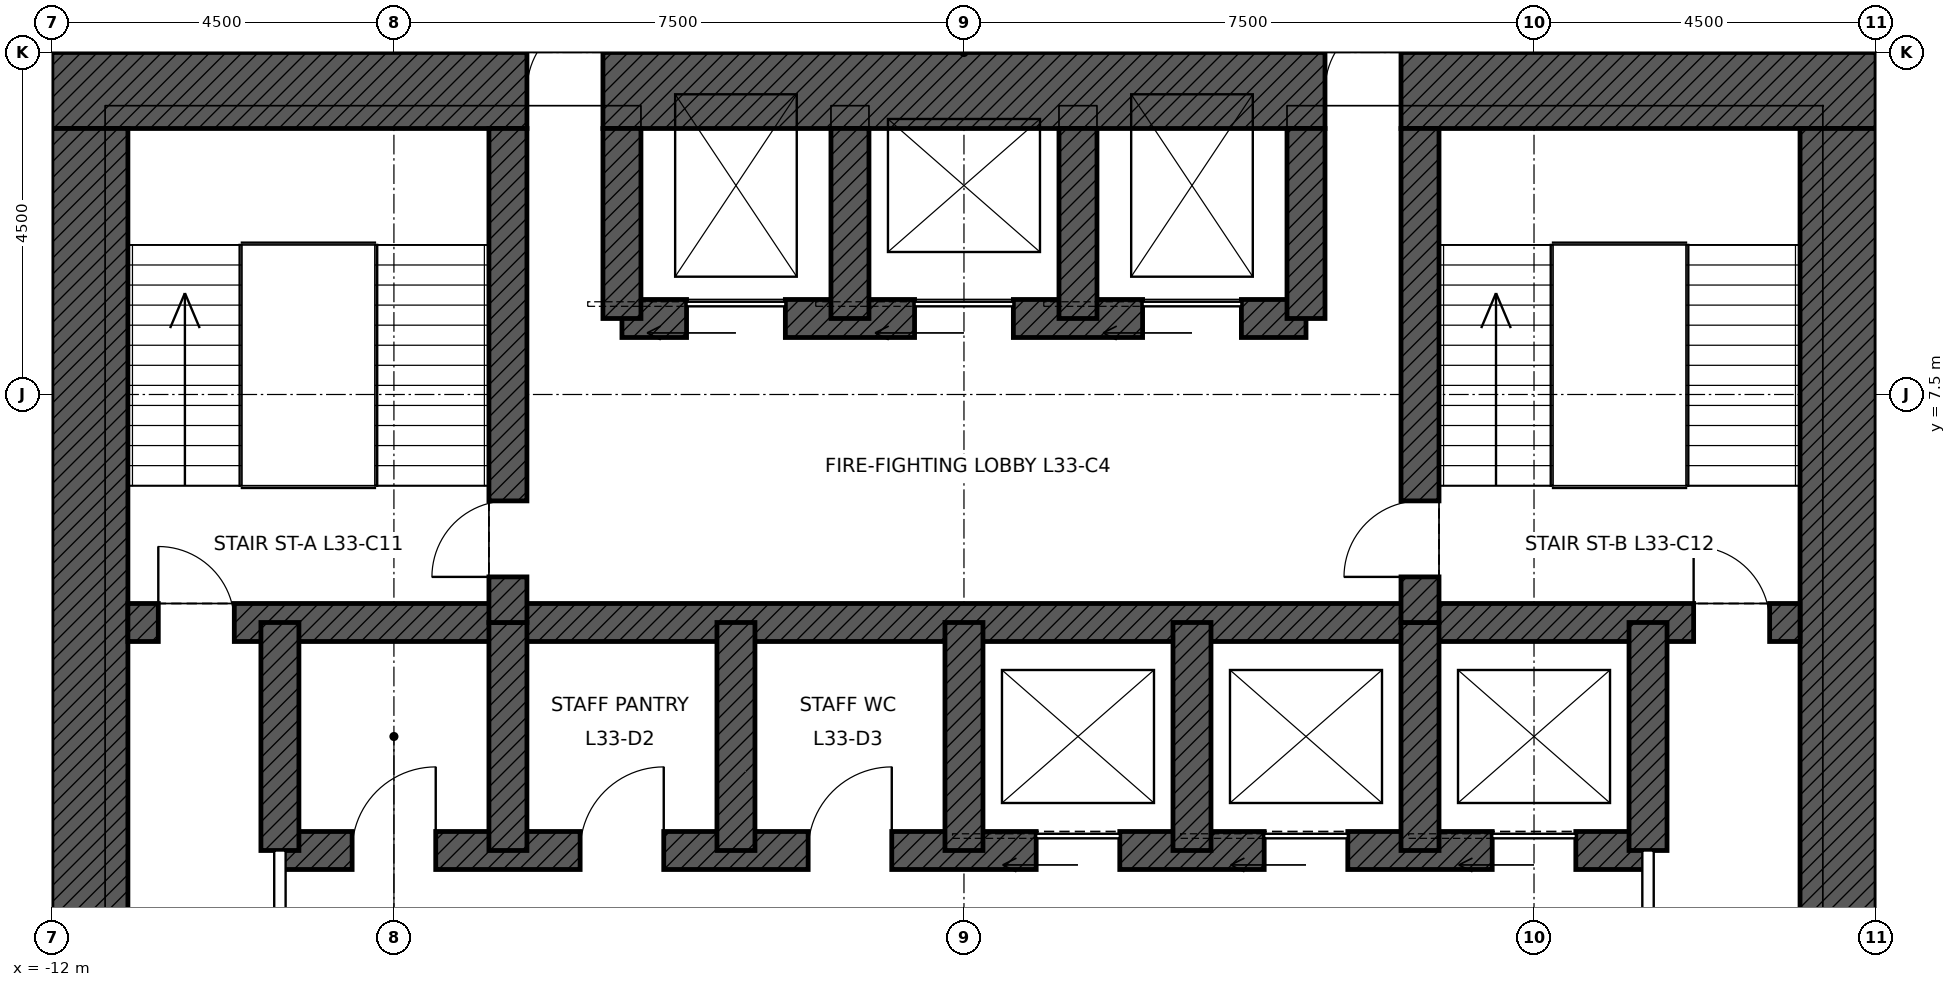
"""IFC4 building model, lengths in metres.
Left out: names, types, materials, properties, quantities, classifications, styles, units other than length and angle.
Written with IfcOpenShell. Run it as: python <this file> out.ifc"""

import sys

from ifc_helpers import new_model, si_unit, direction, frame, frame_2d, origin, place, context, subcontext, project, spatial, rectangle, extrude, element, fill, save


model = new_model("IFC4")
c1 = context("Model", 3, precision=1e-05, world=origin(), true_north=direction((0.0, 1.0)))
c2 = subcontext(c1, "Body", "Model", "MODEL_VIEW")
j1 = project(units=[si_unit("LENGTHUNIT", "METRE"), si_unit("PLANEANGLEUNIT", "RADIAN")], contexts=[c1])
p1 = place(None, origin())
s1 = spatial("IfcSite", under=j1, at=p1, CompositionType="ELEMENT")
p2 = place(p1, origin())
s2 = spatial("IfcBuilding", under=s1, at=p2, CompositionType="ELEMENT")
p3 = place(p2, frame((0.0, 0.0, 162.9)))
s3 = spatial("IfcBuildingStorey", under=s2, at=p3, CompositionType="ELEMENT", Elevation=162.9)
p4 = place(p3, frame((-12.0, 11.5, 0.0), z_axis=(0.0, 0.0, 1.0), x_axis=(1.0, 0.0, 0.0)))
e1 = element("IfcWall", 1, at=p4, inside=s3, PredefinedType="SHEAR", context=c2, shape_type="SweptSolid", body=[
    extrude(rectangle(XDim=24.0, YDim=1.0, at=frame_2d((12.0, 0.0))), origin(), (0.0, 0.0, 1.0), 4.5),
])
p5 = place(p4, frame((6.25, 0.0, 0.0)))
e2 = element("IfcOpeningElement", 2, at=p5, cuts=e1, PredefinedType="OPENING", context=c2, shape_type="SweptSolid", body=[
    extrude(rectangle(XDim=1.0, YDim=2.4, at=frame_2d((0.5, 1.2))), frame((0.0, 0.51, 0.0), z_axis=(0.0, -1.0, 0.0), x_axis=(1.0, 0.0, 0.0)), (0.0, 0.0, 1.0), 1.02),
])
p6 = place(p4, frame((16.75, 0.0, 0.0)))
e3 = element("IfcOpeningElement", 3, at=p6, cuts=e1, PredefinedType="OPENING", context=c2, shape_type="SweptSolid", body=[
    extrude(rectangle(XDim=1.0, YDim=2.4, at=frame_2d((0.5, 1.2))), frame((0.0, 0.51, 0.0), z_axis=(0.0, -1.0, 0.0), x_axis=(1.0, 0.0, 0.0)), (0.0, 0.0, 1.0), 1.02),
])
p7 = place(p3, frame((11.5, 11.0, 0.0), z_axis=(0.0, 0.0, 1.0), x_axis=(0.0, -1.0, 0.0)))
e4 = element("IfcWall", 4, at=p7, inside=s3, PredefinedType="SHEAR", context=c2, shape_type="SweptSolid", body=[
    extrude(rectangle(XDim=22.0, YDim=1.0, at=frame_2d((11.0, 0.0))), origin(), (0.0, 0.0, 1.0), 4.5),
])
p8 = place(p7, frame((10.5, 0.0, 0.0)))
e5 = element("IfcOpeningElement", 5, at=p8, cuts=e4, PredefinedType="OPENING", context=c2, shape_type="SweptSolid", body=[
    extrude(rectangle(XDim=1.0, YDim=2.4, at=frame_2d((0.5, 1.2))), frame((0.0, 0.51, 0.0), z_axis=(0.0, -1.0, 0.0), x_axis=(1.0, 0.0, 0.0)), (0.0, 0.0, 1.0), 1.02),
])
p9 = place(p3, frame((-11.5, -11.0, 0.0), z_axis=(0.0, 0.0, 1.0), x_axis=(0.0, 1.0, 0.0)))
e6 = element("IfcWall", 6, at=p9, inside=s3, PredefinedType="SHEAR", context=c2, shape_type="SweptSolid", body=[
    extrude(rectangle(XDim=22.0, YDim=1.0, at=frame_2d((11.0, 0.0))), origin(), (0.0, 0.0, 1.0), 4.5),
])
p10 = place(p9, frame((10.5, 0.0, 0.0)))
e7 = element("IfcOpeningElement", 7, at=p10, cuts=e6, PredefinedType="OPENING", context=c2, shape_type="SweptSolid", body=[
    extrude(rectangle(XDim=1.0, YDim=2.4, at=frame_2d((0.5, 1.2))), frame((0.0, 0.51, 0.0), z_axis=(0.0, -1.0, 0.0), x_axis=(1.0, 0.0, 0.0)), (0.0, 0.0, 1.0), 1.02),
])
p11 = place(p3, frame((-11.0, 4.5, 0.0), z_axis=(0.0, 0.0, 1.0), x_axis=(1.0, 0.0, 0.0)))
e8 = element("IfcWall", 8, at=p11, inside=s3, PredefinedType="SHEAR", context=c2, shape_type="SweptSolid", body=[
    extrude(rectangle(XDim=22.0, YDim=0.5, at=frame_2d((11.0, 0.0))), origin(), (0.0, 0.0, 1.0), 4.5),
])
p12 = place(p11, frame((0.4, 0.0, 0.0)))
e9 = element("IfcOpeningElement", 9, at=p12, cuts=e8, PredefinedType="OPENING", context=c2, shape_type="SweptSolid", body=[
    extrude(rectangle(XDim=1.0, YDim=2.1, at=frame_2d((0.5, 1.05))), frame((0.0, 0.26, 0.0), z_axis=(0.0, -1.0, 0.0), x_axis=(1.0, 0.0, 0.0)), (0.0, 0.0, 1.0), 0.52),
])
p13 = place(p11, frame((20.6, 0.0, 0.0)))
e10 = element("IfcOpeningElement", 10, at=p13, cuts=e8, PredefinedType="OPENING", context=c2, shape_type="SweptSolid", body=[
    extrude(rectangle(XDim=1.0, YDim=2.1, at=frame_2d((0.5, 1.05))), frame((0.0, 0.26, 0.0), z_axis=(0.0, -1.0, 0.0), x_axis=(1.0, 0.0, 0.0)), (0.0, 0.0, 1.0), 0.52),
])
p14 = place(p3, frame((-9.0, 1.5, 0.0), z_axis=(0.0, 0.0, 1.0), x_axis=(1.0, 0.0, 0.0)))
e11 = element("IfcWall", 11, at=p14, inside=s3, PredefinedType="SHEAR", context=c2, shape_type="SweptSolid", body=[
    extrude(rectangle(XDim=18.0, YDim=0.5, at=frame_2d((9.0, 0.0))), origin(), (0.0, 0.0, 1.0), 4.5),
])
p15 = place(p14, frame((9.95, 0.0, 0.0)))
e12 = element("IfcOpeningElement", 12, at=p15, cuts=e11, PredefinedType="OPENING", context=c2, shape_type="SweptSolid", body=[
    extrude(rectangle(XDim=1.1, YDim=2.1, at=frame_2d((0.55, 1.05))), frame((0.0, 0.26, 0.0), z_axis=(0.0, -1.0, 0.0), x_axis=(1.0, 0.0, 0.0)), (0.0, 0.0, 1.0), 0.52),
])
p16 = place(p14, frame((12.95, 0.0, 0.0)))
e13 = element("IfcOpeningElement", 13, at=p16, cuts=e11, PredefinedType="OPENING", context=c2, shape_type="SweptSolid", body=[
    extrude(rectangle(XDim=1.1, YDim=2.1, at=frame_2d((0.55, 1.05))), frame((0.0, 0.26, 0.0), z_axis=(0.0, -1.0, 0.0), x_axis=(1.0, 0.0, 0.0)), (0.0, 0.0, 1.0), 0.52),
])
p17 = place(p14, frame((15.95, 0.0, 0.0)))
e14 = element("IfcOpeningElement", 14, at=p17, cuts=e11, PredefinedType="OPENING", context=c2, shape_type="SweptSolid", body=[
    extrude(rectangle(XDim=1.1, YDim=2.1, at=frame_2d((0.55, 1.05))), frame((0.0, 0.26, 0.0), z_axis=(0.0, -1.0, 0.0), x_axis=(1.0, 0.0, 0.0)), (0.0, 0.0, 1.0), 0.52),
])
p18 = place(p14, frame((0.95, 0.0, 0.0)))
e15 = element("IfcOpeningElement", 15, at=p18, cuts=e11, PredefinedType="OPENING", context=c2, shape_type="SweptSolid", body=[
    extrude(rectangle(XDim=1.1, YDim=2.1, at=frame_2d((0.55, 1.05))), frame((0.0, 0.26, 0.0), z_axis=(0.0, -1.0, 0.0), x_axis=(1.0, 0.0, 0.0)), (0.0, 0.0, 1.0), 0.52),
])
p19 = place(p14, frame((3.95, 0.0, 0.0)))
e16 = element("IfcOpeningElement", 16, at=p19, cuts=e11, PredefinedType="OPENING", context=c2, shape_type="SweptSolid", body=[
    extrude(rectangle(XDim=1.1, YDim=2.1, at=frame_2d((0.55, 1.05))), frame((0.0, 0.26, 0.0), z_axis=(0.0, -1.0, 0.0), x_axis=(1.0, 0.0, 0.0)), (0.0, 0.0, 1.0), 0.52),
])
p20 = place(p14, frame((6.95, 0.0, 0.0)))
e17 = element("IfcOpeningElement", 17, at=p20, cuts=e11, PredefinedType="OPENING", context=c2, shape_type="SweptSolid", body=[
    extrude(rectangle(XDim=1.1, YDim=2.1, at=frame_2d((0.55, 1.05))), frame((0.0, 0.26, 0.0), z_axis=(0.0, -1.0, 0.0), x_axis=(1.0, 0.0, 0.0)), (0.0, 0.0, 1.0), 0.52),
])
p21 = place(p3, frame((-4.5, 8.5, 0.0), z_axis=(0.0, 0.0, 1.0), x_axis=(1.0, 0.0, 0.0)))
e18 = element("IfcWall", 18, at=p21, inside=s3, PredefinedType="SHEAR", context=c2, shape_type="SweptSolid", body=[
    extrude(rectangle(XDim=9.0, YDim=0.5, at=frame_2d((4.5, 0.0))), origin(), (0.0, 0.0, 1.0), 4.5),
])
p22 = place(p21, frame((0.85, 0.0, 0.0)))
e19 = element("IfcOpeningElement", 19, at=p22, cuts=e18, PredefinedType="OPENING", context=c2, shape_type="SweptSolid", body=[
    extrude(rectangle(XDim=1.3, YDim=2.4, at=frame_2d((0.65, 1.2))), frame((0.0, 0.26, 0.0), z_axis=(0.0, -1.0, 0.0), x_axis=(1.0, 0.0, 0.0)), (0.0, 0.0, 1.0), 0.52),
])
p23 = place(p21, frame((6.85, 0.0, 0.0)))
e20 = element("IfcOpeningElement", 20, at=p23, cuts=e18, PredefinedType="OPENING", context=c2, shape_type="SweptSolid", body=[
    extrude(rectangle(XDim=1.3, YDim=2.4, at=frame_2d((0.65, 1.2))), frame((0.0, 0.26, 0.0), z_axis=(0.0, -1.0, 0.0), x_axis=(1.0, 0.0, 0.0)), (0.0, 0.0, 1.0), 0.52),
])
p24 = place(p21, frame((3.85, 0.0, 0.0)))
e21 = element("IfcOpeningElement", 21, at=p24, cuts=e18, PredefinedType="OPENING", context=c2, shape_type="SweptSolid", body=[
    extrude(rectangle(XDim=1.3, YDim=2.4, at=frame_2d((0.65, 1.2))), frame((0.0, 0.26, 0.0), z_axis=(0.0, -1.0, 0.0), x_axis=(1.0, 0.0, 0.0)), (0.0, 0.0, 1.0), 0.52),
])
for number, where, z_axis, x_axis in (
    (22, (-9.0, 1.5, 0.0), (0.0, 0.0, 1.0), (0.0, 1.0, 0.0)),
    (23, (9.0, 1.5, 0.0), (0.0, 0.0, 1.0), (0.0, 1.0, 0.0)),
    (24, (-6.0, 1.5, 0.0), (0.0, 0.0, 1.0), (0.0, 1.0, 0.0)),
    (25, (-3.0, 1.5, 0.0), (0.0, 0.0, 1.0), (0.0, 1.0, 0.0)),
    (26, (0.0, 1.5, 0.0), (0.0, 0.0, 1.0), (0.0, 1.0, 0.0)),
    (27, (3.0, 1.5, 0.0), (0.0, 0.0, 1.0), (0.0, 1.0, 0.0)),
    (28, (6.0, 1.5, 0.0), (0.0, 0.0, 1.0), (0.0, 1.0, 0.0)),
):
    element("IfcWall", number, at=place(p3, frame(where, z_axis=z_axis, x_axis=x_axis)), inside=s3, PredefinedType="SHEAR", context=c2, shape_type="SweptSolid", body=[
        extrude(rectangle(XDim=3.0, YDim=0.5, at=frame_2d((1.5, 0.0))), origin(), (0.0, 0.0, 1.0), 4.5),
    ])
p25 = place(p3, frame((-6.0, 4.5, 0.0), z_axis=(0.0, 0.0, 1.0), x_axis=(0.0, 1.0, 0.0)))
e29 = element("IfcWall", 29, at=p25, inside=s3, PredefinedType="SHEAR", context=c2, shape_type="SweptSolid", body=[
    extrude(rectangle(XDim=6.5, YDim=0.5, at=frame_2d((3.25, 0.0))), origin(), (0.0, 0.0, 1.0), 4.5),
])
p26 = place(p25, frame((0.6, 0.0, 0.0)))
e30 = element("IfcOpeningElement", 30, at=p26, cuts=e29, PredefinedType="OPENING", context=c2, shape_type="SweptSolid", body=[
    extrude(rectangle(XDim=1.0, YDim=2.1, at=frame_2d((0.5, 1.05))), frame((0.0, 0.26, 0.0), z_axis=(0.0, -1.0, 0.0), x_axis=(1.0, 0.0, 0.0)), (0.0, 0.0, 1.0), 0.52),
])
p27 = place(p3, frame((6.0, 4.5, 0.0), z_axis=(0.0, 0.0, 1.0), x_axis=(0.0, 1.0, 0.0)))
e31 = element("IfcWall", 31, at=p27, inside=s3, PredefinedType="SHEAR", context=c2, shape_type="SweptSolid", body=[
    extrude(rectangle(XDim=6.5, YDim=0.5, at=frame_2d((3.25, 0.0))), origin(), (0.0, 0.0, 1.0), 4.5),
])
p28 = place(p27, frame((0.6, 0.0, 0.0)))
e32 = element("IfcOpeningElement", 32, at=p28, cuts=e31, PredefinedType="OPENING", context=c2, shape_type="SweptSolid", body=[
    extrude(rectangle(XDim=1.0, YDim=2.1, at=frame_2d((0.5, 1.05))), frame((0.0, 0.26, 0.0), z_axis=(0.0, -1.0, 0.0), x_axis=(1.0, 0.0, 0.0)), (0.0, 0.0, 1.0), 0.52),
])
for number, where, z_axis, x_axis in (
    (33, (-4.5, 8.5, 0.0), (0.0, 0.0, 1.0), (0.0, 1.0, 0.0)),
    (34, (4.5, 8.5, 0.0), (0.0, 0.0, 1.0), (0.0, 1.0, 0.0)),
    (35, (-1.5, 8.5, 0.0), (0.0, 0.0, 1.0), (0.0, 1.0, 0.0)),
    (36, (1.5, 8.5, 0.0), (0.0, 0.0, 1.0), (0.0, 1.0, 0.0)),
):
    element("IfcWall", number, at=place(p3, frame(where, z_axis=z_axis, x_axis=x_axis)), inside=s3, PredefinedType="SHEAR", context=c2, shape_type="SweptSolid", body=[
        extrude(rectangle(XDim=2.5, YDim=0.5, at=frame_2d((1.25, 0.0))), origin(), (0.0, 0.0, 1.0), 4.5),
    ])
p29 = place(p3, frame((-9.0, -1.5, 0.0), z_axis=(0.0, 0.0, 1.0), x_axis=(0.0, 1.0, 0.0)))
e37 = element("IfcWall", 37, at=p29, inside=s3, PredefinedType="PARTITIONING", context=c2, shape_type="SweptSolid", body=[
    extrude(rectangle(XDim=3.0, YDim=0.15, at=frame_2d((1.5, 0.0))), origin(), (0.0, 0.0, 1.0), 4.25),
])
p30 = place(p29, frame((1.0, 0.0, 0.0)))
e38 = element("IfcOpeningElement", 38, at=p30, cuts=e37, PredefinedType="OPENING", context=c2, shape_type="SweptSolid", body=[
    extrude(rectangle(XDim=1.0, YDim=2.4, at=frame_2d((0.5, 1.2))), frame((0.0, 0.085, 0.0), z_axis=(0.0, -1.0, 0.0), x_axis=(1.0, 0.0, 0.0)), (0.0, 0.0, 1.0), 0.17),
])
p31 = place(p3, frame((9.0, -1.5, 0.0), z_axis=(0.0, 0.0, 1.0), x_axis=(0.0, 1.0, 0.0)))
e39 = element("IfcWall", 39, at=p31, inside=s3, PredefinedType="PARTITIONING", context=c2, shape_type="SweptSolid", body=[
    extrude(rectangle(XDim=3.0, YDim=0.15, at=frame_2d((1.5, 0.0))), origin(), (0.0, 0.0, 1.0), 4.25),
])
p32 = place(p31, frame((1.0, 0.0, 0.0)))
e40 = element("IfcOpeningElement", 40, at=p32, cuts=e39, PredefinedType="OPENING", context=c2, shape_type="SweptSolid", body=[
    extrude(rectangle(XDim=1.0, YDim=2.4, at=frame_2d((0.5, 1.2))), frame((0.0, 0.085, 0.0), z_axis=(0.0, -1.0, 0.0), x_axis=(1.0, 0.0, 0.0)), (0.0, 0.0, 1.0), 0.17),
])
p33 = place(p12, origin())
e41 = element("IfcDoor", 41, at=p33, inside=s3, OperationType="SINGLE_SWING_LEFT", PredefinedType="DOOR", context=c2, shape_type="SweptSolid", body=[
    extrude(rectangle(XDim=1.0, YDim=2.1, at=frame_2d((0.5, 1.05))), frame((0.0, 0.025, 0.0), z_axis=(0.0, -1.0, 0.0), x_axis=(1.0, 0.0, 0.0)), (0.0, 0.0, 1.0), 0.05),
])
fill(e9, e41)
p34 = place(p13, origin())
e42 = element("IfcDoor", 42, at=p34, inside=s3, OperationType="SINGLE_SWING_LEFT", PredefinedType="DOOR", context=c2, shape_type="SweptSolid", body=[
    extrude(rectangle(XDim=1.0, YDim=2.1, at=frame_2d((0.5, 1.05))), frame((0.0, 0.025, 0.0), z_axis=(0.0, -1.0, 0.0), x_axis=(1.0, 0.0, 0.0)), (0.0, 0.0, 1.0), 0.05),
])
fill(e10, e42)
p35 = place(p26, origin())
e43 = element("IfcDoor", 43, at=p35, inside=s3, OperationType="SINGLE_SWING_LEFT", PredefinedType="DOOR", context=c2, shape_type="SweptSolid", body=[
    extrude(rectangle(XDim=1.0, YDim=2.1, at=frame_2d((0.5, 1.05))), frame((0.0, 0.025, 0.0), z_axis=(0.0, -1.0, 0.0), x_axis=(1.0, 0.0, 0.0)), (0.0, 0.0, 1.0), 0.05),
])
fill(e30, e43)
p36 = place(p28, origin())
e44 = element("IfcDoor", 44, at=p36, inside=s3, OperationType="SINGLE_SWING_LEFT", PredefinedType="DOOR", context=c2, shape_type="SweptSolid", body=[
    extrude(rectangle(XDim=1.0, YDim=2.1, at=frame_2d((0.5, 1.05))), frame((0.0, 0.025, 0.0), z_axis=(0.0, -1.0, 0.0), x_axis=(1.0, 0.0, 0.0)), (0.0, 0.0, 1.0), 0.05),
])
fill(e32, e44)
p37 = place(p5, origin())
e45 = element("IfcDoor", 45, at=p37, inside=s3, OperationType="SINGLE_SWING_RIGHT", PredefinedType="DOOR", context=c2, shape_type="SweptSolid", body=[
    extrude(rectangle(XDim=1.0, YDim=2.4, at=frame_2d((0.5, 1.2))), frame((0.0, 0.485, 0.0), z_axis=(0.0, -1.0, 0.0), x_axis=(1.0, 0.0, 0.0)), (0.0, 0.0, 1.0), 0.05),
])
fill(e2, e45)
p38 = place(p6, origin())
e46 = element("IfcDoor", 46, at=p38, inside=s3, OperationType="SINGLE_SWING_RIGHT", PredefinedType="DOOR", context=c2, shape_type="SweptSolid", body=[
    extrude(rectangle(XDim=1.0, YDim=2.4, at=frame_2d((0.5, 1.2))), frame((0.0, 0.485, 0.0), z_axis=(0.0, -1.0, 0.0), x_axis=(1.0, 0.0, 0.0)), (0.0, 0.0, 1.0), 0.05),
])
fill(e3, e46)
p39 = place(p22, origin())
e47 = element("IfcDoor", 47, at=p39, inside=s3, OperationType="SLIDING_TO_LEFT", PredefinedType="DOOR", context=c2, shape_type="SweptSolid", body=[
    extrude(rectangle(XDim=1.3, YDim=2.4, at=frame_2d((0.65, 1.2))), frame((0.0, 0.025, 0.0), z_axis=(0.0, -1.0, 0.0), x_axis=(1.0, 0.0, 0.0)), (0.0, 0.0, 1.0), 0.05),
])
fill(e19, e47)
p40 = place(p23, origin())
e48 = element("IfcDoor", 48, at=p40, inside=s3, OperationType="SLIDING_TO_LEFT", PredefinedType="DOOR", context=c2, shape_type="SweptSolid", body=[
    extrude(rectangle(XDim=1.3, YDim=2.4, at=frame_2d((0.65, 1.2))), frame((0.0, 0.025, 0.0), z_axis=(0.0, -1.0, 0.0), x_axis=(1.0, 0.0, 0.0)), (0.0, 0.0, 1.0), 0.05),
])
fill(e20, e48)
p41 = place(p24, origin())
e49 = element("IfcDoor", 49, at=p41, inside=s3, OperationType="SLIDING_TO_LEFT", PredefinedType="DOOR", context=c2, shape_type="SweptSolid", body=[
    extrude(rectangle(XDim=1.3, YDim=2.4, at=frame_2d((0.65, 1.2))), frame((0.0, 0.025, 0.0), z_axis=(0.0, -1.0, 0.0), x_axis=(1.0, 0.0, 0.0)), (0.0, 0.0, 1.0), 0.05),
])
fill(e21, e49)
p42 = place(p15, origin())
e50 = element("IfcDoor", 50, at=p42, inside=s3, OperationType="SLIDING_TO_LEFT", PredefinedType="DOOR", context=c2, shape_type="SweptSolid", body=[
    extrude(rectangle(XDim=1.1, YDim=2.1, at=frame_2d((0.55, 1.05))), frame((0.0, 0.025, 0.0), z_axis=(0.0, -1.0, 0.0), x_axis=(1.0, 0.0, 0.0)), (0.0, 0.0, 1.0), 0.05),
])
fill(e12, e50)
p43 = place(p16, origin())
e51 = element("IfcDoor", 51, at=p43, inside=s3, OperationType="SLIDING_TO_LEFT", PredefinedType="DOOR", context=c2, shape_type="SweptSolid", body=[
    extrude(rectangle(XDim=1.1, YDim=2.1, at=frame_2d((0.55, 1.05))), frame((0.0, 0.025, 0.0), z_axis=(0.0, -1.0, 0.0), x_axis=(1.0, 0.0, 0.0)), (0.0, 0.0, 1.0), 0.05),
])
fill(e13, e51)
p44 = place(p17, origin())
e52 = element("IfcDoor", 52, at=p44, inside=s3, OperationType="SLIDING_TO_LEFT", PredefinedType="DOOR", context=c2, shape_type="SweptSolid", body=[
    extrude(rectangle(XDim=1.1, YDim=2.1, at=frame_2d((0.55, 1.05))), frame((0.0, 0.025, 0.0), z_axis=(0.0, -1.0, 0.0), x_axis=(1.0, 0.0, 0.0)), (0.0, 0.0, 1.0), 0.05),
])
fill(e14, e52)
p45 = place(p18, origin())
e53 = element("IfcDoor", 53, at=p45, inside=s3, OperationType="SINGLE_SWING_RIGHT", PredefinedType="DOOR", context=c2, shape_type="SweptSolid", body=[
    extrude(rectangle(XDim=1.1, YDim=2.1, at=frame_2d((0.55, 1.05))), frame((0.0, 0.025, 0.0), z_axis=(0.0, -1.0, 0.0), x_axis=(1.0, 0.0, 0.0)), (0.0, 0.0, 1.0), 0.05),
])
fill(e15, e53)
p46 = place(p19, origin())
e54 = element("IfcDoor", 54, at=p46, inside=s3, OperationType="SINGLE_SWING_RIGHT", PredefinedType="DOOR", context=c2, shape_type="SweptSolid", body=[
    extrude(rectangle(XDim=1.1, YDim=2.1, at=frame_2d((0.55, 1.05))), frame((0.0, 0.025, 0.0), z_axis=(0.0, -1.0, 0.0), x_axis=(1.0, 0.0, 0.0)), (0.0, 0.0, 1.0), 0.05),
])
fill(e16, e54)
p47 = place(p20, origin())
e55 = element("IfcDoor", 55, at=p47, inside=s3, OperationType="SINGLE_SWING_RIGHT", PredefinedType="DOOR", context=c2, shape_type="SweptSolid", body=[
    extrude(rectangle(XDim=1.1, YDim=2.1, at=frame_2d((0.55, 1.05))), frame((0.0, 0.025, 0.0), z_axis=(0.0, -1.0, 0.0), x_axis=(1.0, 0.0, 0.0)), (0.0, 0.0, 1.0), 0.05),
])
fill(e17, e55)
save(model, sys.argv[1])
